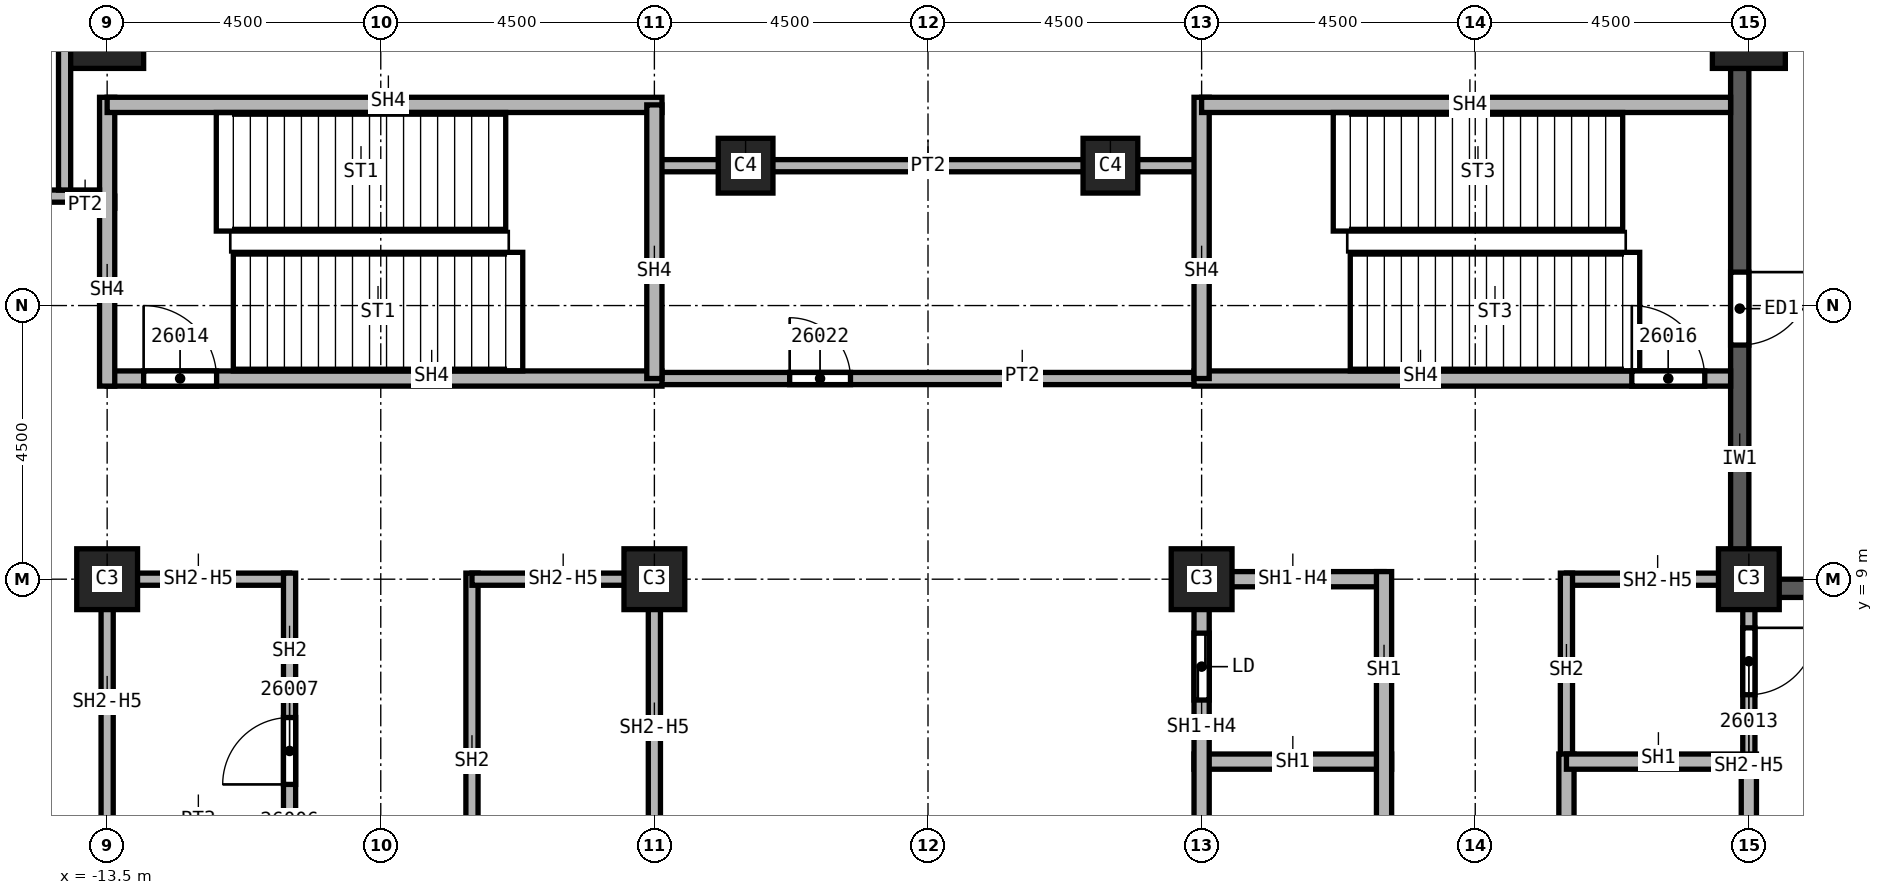
"""IFC4 building model, lengths in metres.
Left out: names, types, materials, properties, quantities, classifications, styles, units other than length and angle.
Written with IfcOpenShell. Run it as: python <this file> out.ifc"""

import sys

from ifc_helpers import new_model, si_unit, direction, frame, frame_2d, origin, origin_2d, place, context, subcontext, project, spatial, rectangle, extrude, element, fill, save


model = new_model("IFC4")
c1 = context("Model", 3, precision=1e-05, world=origin(), true_north=direction((0.0, 1.0)))
c2 = subcontext(c1, "Body", "Model", "MODEL_VIEW")
j1 = project(units=[si_unit("LENGTHUNIT", "METRE"), si_unit("PLANEANGLEUNIT", "RADIAN")], contexts=[c1])
p1 = place(None, origin())
s1 = spatial("IfcSite", under=j1, at=p1, CompositionType="ELEMENT")
p2 = place(p1, origin())
s2 = spatial("IfcBuilding", under=s1, at=p2, CompositionType="ELEMENT")
p3 = place(p2, frame((0.0, 0.0, 120.0)))
s3 = spatial("IfcBuildingStorey", under=s2, at=p3, CompositionType="ELEMENT", Elevation=120.0)
for number, where, z_axis, x_axis in (
    (1, (13.5, 18.0, 0.0), (0.0, 0.0, 1.0), (1.0, 0.0, 0.0)),
    (2, (-13.5, 18.0, 0.0), (0.0, 0.0, 1.0), (1.0, 0.0, 0.0)),
):
    element("IfcColumn", number, at=place(p3, frame(where, z_axis=z_axis, x_axis=x_axis)), inside=s3, PredefinedType="COLUMN", context=c2, shape_type="SweptSolid", body=[
        extrude(rectangle(XDim=1.2, YDim=1.2, at=origin_2d()), origin(), (0.0, 0.0, 1.0), 5.7),
    ])
for number, where, z_axis, x_axis in (
    (3, (4.5, 9.0, 0.0), (0.0, 0.0, 1.0), (1.0, 0.0, 0.0)),
    (4, (13.5, 9.0, 0.0), (0.0, 0.0, 1.0), (1.0, 0.0, 0.0)),
    (5, (-4.5, 9.0, 0.0), (0.0, 0.0, 1.0), (1.0, 0.0, 0.0)),
    (6, (-13.5, 9.0, 0.0), (0.0, 0.0, 1.0), (1.0, 0.0, 0.0)),
):
    element("IfcColumn", number, at=place(p3, frame(where, z_axis=z_axis, x_axis=x_axis)), inside=s3, PredefinedType="COLUMN", context=c2, shape_type="SweptSolid", body=[
        extrude(rectangle(XDim=1.0, YDim=1.0, at=origin_2d()), origin(), (0.0, 0.0, 1.0), 5.7),
    ])
for number, where, z_axis, x_axis in (
    (7, (3.0, 15.8, 0.0), (0.0, -0.206, 0.979), (1.0, 0.0, 0.0)),
    (8, (-3.0, 15.8, 0.0), (0.0, -0.206, 0.979), (1.0, 0.0, 0.0)),
):
    element("IfcColumn", number, at=place(p3, frame(where, z_axis=z_axis, x_axis=x_axis)), inside=s3, PredefinedType="COLUMN", context=c2, shape_type="SweptSolid", body=[
        extrude(rectangle(XDim=0.9, YDim=0.9, at=origin_2d()), origin(), (0.0, 0.0, 1.0), 5.825),
    ])
p4 = place(p3, frame((13.35, 17.4, 0.0), z_axis=(0.0, 0.0, 1.0), x_axis=(0.0, -1.0, 0.0)))
e9 = element("IfcWall", 9, at=p4, inside=s3, PredefinedType="SOLIDWALL", context=c2, shape_type="SweptSolid", body=[
    extrude(rectangle(XDim=8.35, YDim=0.3, at=frame_2d((4.175, 0.0))), origin(), (0.0, 0.0, 1.0), 5.1),
])
p5 = place(p4, frame((3.35, 0.0, 0.0)))
e10 = element("IfcOpeningElement", 10, at=p5, cuts=e9, PredefinedType="OPENING", context=c2, shape_type="SweptSolid", body=[
    extrude(rectangle(XDim=1.2, YDim=2.4, at=frame_2d((0.6, 1.2))), frame((0.0, 0.15, 0.0), z_axis=(0.0, -1.0, 0.0), x_axis=(1.0, 0.0, 0.0)), (0.0, 0.0, 1.0), 0.3),
])
p6 = place(p3, frame((21.9, 8.85, 0.0), z_axis=(0.0, 0.0, 1.0), x_axis=(-1.0, 0.0, 0.0)))
e11 = element("IfcWall", 11, at=p6, inside=s3, PredefinedType="SOLIDWALL", context=c2, shape_type="SweptSolid", body=[
    extrude(rectangle(XDim=8.35, YDim=0.3, at=frame_2d((4.175, 0.0))), origin(), (0.0, 0.0, 1.0), 5.1),
])
p7 = place(p3, frame((-14.1, 15.2, 0.0), z_axis=(0.0, 0.0, 1.0), x_axis=(1.0, 0.0, 0.0)))
e12 = element("IfcWall", 12, at=p7, inside=s3, PredefinedType="PARTITIONING", context=c2, shape_type="SweptSolid", body=[
    extrude(rectangle(XDim=0.725, YDim=0.2, at=frame_2d((0.363, 0.0))), origin(), (0.0, 0.0, 1.0), 5.7),
])
p8 = place(p3, frame((-4.625, 12.3, 0.0), z_axis=(0.0, 0.0, 1.0), x_axis=(1.0, 0.0, 0.0)))
e13 = element("IfcWall", 13, at=p8, inside=s3, PredefinedType="PARTITIONING", context=c2, shape_type="SweptSolid", body=[
    extrude(rectangle(XDim=9.25, YDim=0.2, at=frame_2d((4.625, 0.0))), origin(), (0.0, 0.0, 1.0), 5.7),
])
p9 = place(p8, frame((2.35, 0.0, 0.0)))
e14 = element("IfcOpeningElement", 14, at=p9, cuts=e13, PredefinedType="OPENING", context=c2, shape_type="SweptSolid", body=[
    extrude(rectangle(XDim=1.0, YDim=2.1, at=frame_2d((0.5, 1.05))), frame((0.0, 0.1, 0.0), z_axis=(0.0, -1.0, 0.0), x_axis=(1.0, 0.0, 0.0)), (0.0, 0.0, 1.0), 0.2),
])
p10 = place(p3, frame((-4.5, 15.8, 0.0), z_axis=(0.0, 0.0, 1.0), x_axis=(1.0, 0.0, 0.0)))
e15 = element("IfcWall", 15, at=p10, inside=s3, PredefinedType="PARTITIONING", context=c2, shape_type="SweptSolid", body=[
    extrude(rectangle(XDim=9.0, YDim=0.2, at=frame_2d((4.5, 0.0))), origin(), (0.0, 0.0, 1.0), 5.7),
])
p11 = place(p3, frame((-13.5, 5.0, 0.0), z_axis=(0.0, 0.0, 1.0), x_axis=(0.0, 1.0, 0.0)))
e16 = element("IfcWall", 16, at=p11, inside=s3, PredefinedType="SOLIDWALL", context=c2, shape_type="SweptSolid", body=[
    extrude(rectangle(XDim=4.1, YDim=0.2, at=frame_2d((2.05, 0.0))), origin(), (0.0, 0.0, 1.0), 4.938),
])
p12 = place(p3, frame((-13.5, 9.0, 0.0), z_axis=(0.0, 0.0, 1.0), x_axis=(1.0, 0.0, 0.0)))
e17 = element("IfcWall", 17, at=p12, inside=s3, PredefinedType="SOLIDWALL", context=c2, shape_type="SweptSolid", body=[
    extrude(rectangle(XDim=3.0, YDim=0.2, at=frame_2d((1.5, 0.0))), origin(), (0.0, 0.0, 1.0), 4.938),
])
p13 = place(p3, frame((-10.5, 4.925, 0.0), z_axis=(0.0, 0.0, 1.0), x_axis=(0.0, 1.0, 0.0)))
e18 = element("IfcWall", 18, at=p13, inside=s3, PredefinedType="SOLIDWALL", context=c2, shape_type="SweptSolid", body=[
    extrude(rectangle(XDim=4.175, YDim=0.2, at=frame_2d((2.087, 0.0))), origin(), (0.0, 0.0, 1.0), 5.7),
])
p14 = place(p13, frame((0.7, 0.0, 0.0)))
e19 = element("IfcOpeningElement", 19, at=p14, cuts=e18, PredefinedType="OPENING", context=c2, shape_type="SweptSolid", body=[
    extrude(rectangle(XDim=1.1, YDim=2.1, at=frame_2d((0.55, 1.05))), frame((0.0, 0.1, 0.0), z_axis=(0.0, -1.0, 0.0), x_axis=(1.0, 0.0, 0.0)), (0.0, 0.0, 1.0), 0.2),
])
p15 = place(p3, frame((-7.5, 2.875, 0.0), z_axis=(0.0, 0.0, 1.0), x_axis=(0.0, 1.0, 0.0)))
e20 = element("IfcWall", 20, at=p15, inside=s3, PredefinedType="SOLIDWALL", context=c2, shape_type="SweptSolid", body=[
    extrude(rectangle(XDim=6.225, YDim=0.2, at=frame_2d((3.113, 0.0))), origin(), (0.0, 0.0, 1.0), 5.7),
])
p16 = place(p3, frame((-7.5, 9.0, 0.0), z_axis=(0.0, 0.0, 1.0), x_axis=(1.0, 0.0, 0.0)))
e21 = element("IfcWall", 21, at=p16, inside=s3, PredefinedType="SOLIDWALL", context=c2, shape_type="SweptSolid", body=[
    extrude(rectangle(XDim=3.0, YDim=0.2, at=frame_2d((1.5, 0.0))), origin(), (0.0, 0.0, 1.0), 4.938),
])
p17 = place(p3, frame((-4.5, 9.1, 0.0), z_axis=(0.0, 0.0, 1.0), x_axis=(0.0, -1.0, 0.0)))
e22 = element("IfcWall", 22, at=p17, inside=s3, PredefinedType="SOLIDWALL", context=c2, shape_type="SweptSolid", body=[
    extrude(rectangle(XDim=9.1, YDim=0.2, at=frame_2d((4.55, 0.0))), origin(), (0.0, 0.0, 1.0), 4.938),
])
p18 = place(p17, frame((4.9, 0.0, 0.0)))
e23 = element("IfcOpeningElement", 23, at=p18, cuts=e22, PredefinedType="OPENING", context=c2, shape_type="SweptSolid", body=[
    extrude(rectangle(XDim=1.1, YDim=2.1, at=frame_2d((0.55, 1.05))), frame((0.0, 0.1, 0.0), z_axis=(0.0, -1.0, 0.0), x_axis=(1.0, 0.0, 0.0)), (0.0, 0.0, 1.0), 0.2),
])
p19 = place(p3, frame((10.5, 9.0, 0.0), z_axis=(0.0, 0.0, 1.0), x_axis=(1.0, 0.0, 0.0)))
e24 = element("IfcWall", 24, at=p19, inside=s3, PredefinedType="SOLIDWALL", context=c2, shape_type="SweptSolid", body=[
    extrude(rectangle(XDim=3.0, YDim=0.2, at=frame_2d((1.5, 0.0))), origin(), (0.0, 0.0, 1.0), 4.938),
])
p20 = place(p3, frame((10.5, 9.1, 0.0), z_axis=(0.0, 0.0, 1.0), x_axis=(0.0, -1.0, 0.0)))
e25 = element("IfcWall", 25, at=p20, inside=s3, PredefinedType="SOLIDWALL", context=c2, shape_type="SweptSolid", body=[
    extrude(rectangle(XDim=3.225, YDim=0.2, at=frame_2d((1.613, 0.0))), origin(), (0.0, 0.0, 1.0), 5.7),
])
p21 = place(p3, frame((13.5, 9.05, 0.0), z_axis=(0.0, 0.0, 1.0), x_axis=(0.0, -1.0, 0.0)))
e26 = element("IfcWall", 26, at=p21, inside=s3, PredefinedType="SOLIDWALL", context=c2, shape_type="SweptSolid", body=[
    extrude(rectangle(XDim=3.05, YDim=0.2, at=frame_2d((1.525, 0.0))), origin(), (0.0, 0.0, 1.0), 4.938),
])
p22 = place(p21, frame((0.85, 0.0, 0.0)))
e27 = element("IfcOpeningElement", 27, at=p22, cuts=e26, PredefinedType="OPENING", context=c2, shape_type="SweptSolid", body=[
    extrude(rectangle(XDim=1.1, YDim=2.1, at=frame_2d((0.55, 1.05))), frame((0.0, 0.1, 0.0), z_axis=(0.0, -1.0, 0.0), x_axis=(1.0, 0.0, 0.0)), (0.0, 0.0, 1.0), 0.2),
])
p23 = place(p3, frame((4.375, 6.0, 0.0), z_axis=(0.0, 0.0, 1.0), x_axis=(1.0, 0.0, 0.0)))
e28 = element("IfcWall", 28, at=p23, inside=s3, PredefinedType="SOLIDWALL", context=c2, shape_type="SweptSolid", body=[
    extrude(rectangle(XDim=3.25, YDim=0.25, at=frame_2d((1.625, 0.0))), origin(), (0.0, 0.0, 1.0), 5.7),
])
p24 = place(p3, frame((4.5, 0.0, 0.0), z_axis=(0.0, 0.0, 1.0), x_axis=(0.0, 1.0, 0.0)))
e29 = element("IfcWall", 29, at=p24, inside=s3, PredefinedType="SOLIDWALL", context=c2, shape_type="SweptSolid", body=[
    extrude(rectangle(XDim=9.125, YDim=0.25, at=frame_2d((4.562, 0.0))), origin(), (0.0, 0.0, 1.0), 4.938),
])
p25 = place(p24, frame((0.95, 0.0, 0.0)))
e30 = element("IfcOpeningElement", 30, at=p25, cuts=e29, PredefinedType="OPENING", context=c2, shape_type="SweptSolid", body=[
    extrude(rectangle(XDim=1.1, YDim=2.1, at=frame_2d((0.55, 1.05))), frame((0.0, 0.125, 0.0), z_axis=(0.0, -1.0, 0.0), x_axis=(1.0, 0.0, 0.0)), (0.0, 0.0, 1.0), 0.25),
])
p26 = place(p24, frame((3.95, 0.0, 0.0)))
e31 = element("IfcOpeningElement", 31, at=p26, cuts=e29, PredefinedType="OPENING", context=c2, shape_type="SweptSolid", body=[
    extrude(rectangle(XDim=1.1, YDim=2.1, at=frame_2d((0.55, 1.05))), frame((0.0, 0.125, 0.0), z_axis=(0.0, -1.0, 0.0), x_axis=(1.0, 0.0, 0.0)), (0.0, 0.0, 1.0), 0.25),
])
p27 = place(p24, frame((7.012, 0.0, 0.0)))
e32 = element("IfcOpeningElement", 32, at=p27, cuts=e29, PredefinedType="OPENING", context=c2, shape_type="SweptSolid", body=[
    extrude(rectangle(XDim=1.1, YDim=2.1, at=frame_2d((0.55, 1.05))), frame((0.0, 0.125, 0.0), z_axis=(0.0, -1.0, 0.0), x_axis=(1.0, 0.0, 0.0)), (0.0, 0.0, 1.0), 0.25),
])
p28 = place(p3, frame((4.5, 9.0, 0.0), z_axis=(0.0, 0.0, 1.0), x_axis=(1.0, 0.0, 0.0)))
e33 = element("IfcWall", 33, at=p28, inside=s3, PredefinedType="SOLIDWALL", context=c2, shape_type="SweptSolid", body=[
    extrude(rectangle(XDim=3.0, YDim=0.25, at=frame_2d((1.5, 0.0))), origin(), (0.0, 0.0, 1.0), 4.938),
])
p29 = place(p3, frame((7.5, 9.125, 0.0), z_axis=(0.0, 0.0, 1.0), x_axis=(0.0, -1.0, 0.0)))
e34 = element("IfcWall", 34, at=p29, inside=s3, PredefinedType="SOLIDWALL", context=c2, shape_type="SweptSolid", body=[
    extrude(rectangle(XDim=12.25, YDim=0.25, at=frame_2d((6.125, 0.0))), origin(), (0.0, 0.0, 1.0), 5.7),
])
p30 = place(p3, frame((10.5, 6.125, 0.0), z_axis=(0.0, 0.0, 1.0), x_axis=(0.0, -1.0, 0.0)))
e35 = element("IfcWall", 35, at=p30, inside=s3, PredefinedType="SOLIDWALL", context=c2, shape_type="SweptSolid", body=[
    extrude(rectangle(XDim=9.25, YDim=0.25, at=frame_2d((4.625, 0.0))), origin(), (0.0, 0.0, 1.0), 5.7),
])
p31 = place(p30, frame((7.075, 0.0, 0.0)))
e36 = element("IfcOpeningElement", 36, at=p31, cuts=e35, PredefinedType="OPENING", context=c2, shape_type="SweptSolid", body=[
    extrude(rectangle(XDim=1.1, YDim=2.1, at=frame_2d((0.55, 1.05))), frame((0.0, 0.125, 0.0), z_axis=(0.0, -1.0, 0.0), x_axis=(1.0, 0.0, 0.0)), (0.0, 0.0, 1.0), 0.25),
])
p32 = place(p30, frame((4.075, 0.0, 0.0)))
e37 = element("IfcOpeningElement", 37, at=p32, cuts=e35, PredefinedType="OPENING", context=c2, shape_type="SweptSolid", body=[
    extrude(rectangle(XDim=1.1, YDim=2.1, at=frame_2d((0.55, 1.05))), frame((0.0, 0.125, 0.0), z_axis=(0.0, -1.0, 0.0), x_axis=(1.0, 0.0, 0.0)), (0.0, 0.0, 1.0), 0.25),
])
p33 = place(p3, frame((10.5, 6.0, 0.0), z_axis=(0.0, 0.0, 1.0), x_axis=(1.0, 0.0, 0.0)))
e38 = element("IfcWall", 38, at=p33, inside=s3, PredefinedType="SOLIDWALL", context=c2, shape_type="SweptSolid", body=[
    extrude(rectangle(XDim=3.125, YDim=0.25, at=frame_2d((1.562, 0.0))), origin(), (0.0, 0.0, 1.0), 5.7),
])
p34 = place(p3, frame((13.5, 6.0, 0.0), z_axis=(0.0, 0.0, 1.0), x_axis=(0.0, -1.0, 0.0)))
e39 = element("IfcWall", 39, at=p34, inside=s3, PredefinedType="SOLIDWALL", context=c2, shape_type="SweptSolid", body=[
    extrude(rectangle(XDim=9.0, YDim=0.25, at=frame_2d((4.5, 0.0))), origin(), (0.0, 0.0, 1.0), 4.938),
])
p35 = place(p3, frame((-13.5, 12.3, 0.0), z_axis=(0.0, 0.0, 1.0), x_axis=(1.0, 0.0, 0.0)))
e40 = element("IfcWall", 40, at=p35, inside=s3, PredefinedType="SOLIDWALL", context=c2, shape_type="SweptSolid", body=[
    extrude(rectangle(XDim=9.125, YDim=0.25, at=frame_2d((4.562, 0.0))), origin(), (0.0, 0.0, 1.0), 5.7),
])
p36 = place(p35, frame((0.6, 0.0, 0.0)))
e41 = element("IfcOpeningElement", 41, at=p36, cuts=e40, PredefinedType="OPENING", context=c2, shape_type="SweptSolid", body=[
    extrude(rectangle(XDim=1.2, YDim=2.1, at=frame_2d((0.6, 1.05))), frame((0.0, 0.125, 0.0), z_axis=(0.0, -1.0, 0.0), x_axis=(1.0, 0.0, 0.0)), (0.0, 0.0, 1.0), 0.25),
])
p37 = place(p3, frame((-13.5, 12.175, 0.0), z_axis=(0.0, 0.0, 1.0), x_axis=(0.0, 1.0, 0.0)))
e42 = element("IfcWall", 42, at=p37, inside=s3, PredefinedType="SOLIDWALL", context=c2, shape_type="SweptSolid", body=[
    extrude(rectangle(XDim=4.75, YDim=0.25, at=frame_2d((2.375, 0.0))), origin(), (0.0, 0.0, 1.0), 5.7),
])
p38 = place(p3, frame((-13.5, 16.8, 0.0), z_axis=(0.0, 0.0, 1.0), x_axis=(1.0, 0.0, 0.0)))
e43 = element("IfcWall", 43, at=p38, inside=s3, PredefinedType="SOLIDWALL", context=c2, shape_type="SweptSolid", body=[
    extrude(rectangle(XDim=9.125, YDim=0.25, at=frame_2d((4.562, 0.0))), origin(), (0.0, 0.0, 1.0), 5.7),
])
p39 = place(p3, frame((-4.5, 16.8, 0.0), z_axis=(0.0, 0.0, 1.0), x_axis=(0.0, -1.0, 0.0)))
e44 = element("IfcWall", 44, at=p39, inside=s3, PredefinedType="SOLIDWALL", context=c2, shape_type="SweptSolid", body=[
    extrude(rectangle(XDim=4.5, YDim=0.25, at=frame_2d((2.25, 0.0))), origin(), (0.0, 0.0, 1.0), 5.7),
])
p40 = place(p3, frame((4.375, 12.3, 0.0), z_axis=(0.0, 0.0, 1.0), x_axis=(1.0, 0.0, 0.0)))
e45 = element("IfcWall", 45, at=p40, inside=s3, PredefinedType="SOLIDWALL", context=c2, shape_type="SweptSolid", body=[
    extrude(rectangle(XDim=8.825, YDim=0.25, at=frame_2d((4.413, 0.0))), origin(), (0.0, 0.0, 1.0), 5.7),
])
p41 = place(p40, frame((7.2, 0.0, 0.0)))
e46 = element("IfcOpeningElement", 46, at=p41, cuts=e45, PredefinedType="OPENING", context=c2, shape_type="SweptSolid", body=[
    extrude(rectangle(XDim=1.2, YDim=2.1, at=frame_2d((0.6, 1.05))), frame((0.0, 0.125, 0.0), z_axis=(0.0, -1.0, 0.0), x_axis=(1.0, 0.0, 0.0)), (0.0, 0.0, 1.0), 0.25),
])
p42 = place(p3, frame((4.5, 12.3, 0.0), z_axis=(0.0, 0.0, 1.0), x_axis=(0.0, 1.0, 0.0)))
e47 = element("IfcWall", 47, at=p42, inside=s3, PredefinedType="SOLIDWALL", context=c2, shape_type="SweptSolid", body=[
    extrude(rectangle(XDim=4.625, YDim=0.25, at=frame_2d((2.312, 0.0))), origin(), (0.0, 0.0, 1.0), 5.7),
])
p43 = place(p3, frame((4.5, 16.8, 0.0), z_axis=(0.0, 0.0, 1.0), x_axis=(1.0, 0.0, 0.0)))
e48 = element("IfcWall", 48, at=p43, inside=s3, PredefinedType="SOLIDWALL", context=c2, shape_type="SweptSolid", body=[
    extrude(rectangle(XDim=8.7, YDim=0.25, at=frame_2d((4.35, 0.0))), origin(), (0.0, 0.0, 1.0), 5.7),
])
p44 = place(p3, frame((-21.9, 15.3, 0.0), z_axis=(0.0, 0.0, 1.0), x_axis=(1.0, 0.0, 0.0)))
e49 = element("IfcWall", 49, at=p44, inside=s3, PredefinedType="SOLIDWALL", context=c2, shape_type="SweptSolid", body=[
    extrude(rectangle(XDim=8.275, YDim=0.2, at=frame_2d((4.137, 0.0))), origin(), (0.0, 0.0, 1.0), 5.7),
])
p45 = place(p44, frame((4.8, 0.0, 0.0)))
e50 = element("IfcOpeningElement", 50, at=p45, cuts=e49, PredefinedType="OPENING", context=c2, shape_type="SweptSolid", body=[
    extrude(rectangle(XDim=1.2, YDim=2.1, at=frame_2d((0.6, 1.05))), frame((0.0, 0.1, 0.0), z_axis=(0.0, -1.0, 0.0), x_axis=(1.0, 0.0, 0.0)), (0.0, 0.0, 1.0), 0.2),
])
p46 = place(p3, frame((-14.2, 15.4, 0.0), z_axis=(0.0, 0.0, 1.0), x_axis=(0.0, 1.0, 0.0)))
e51 = element("IfcWall", 51, at=p46, inside=s3, PredefinedType="SOLIDWALL", context=c2, shape_type="SweptSolid", body=[
    extrude(rectangle(XDim=5.9, YDim=0.2, at=frame_2d((2.95, 0.0))), origin(), (0.0, 0.0, 1.0), 5.7),
])
p47 = place(p5, origin())
e52 = element("IfcDoor", 52, at=p47, inside=s3, OperationType="SINGLE_SWING_LEFT", PredefinedType="DOOR", context=c2, shape_type="SweptSolid", body=[
    extrude(rectangle(XDim=1.2, YDim=2.4, at=frame_2d((0.6, 1.2))), frame((0.0, 0.025, 0.0), z_axis=(0.0, -1.0, 0.0), x_axis=(1.0, 0.0, 0.0)), (0.0, 0.0, 1.0), 0.05),
])
fill(e10, e52)
p48 = place(p14, origin())
e53 = element("IfcDoor", 53, at=p48, inside=s3, OperationType="SINGLE_SWING_RIGHT", PredefinedType="DOOR", context=c2, shape_type="SweptSolid", body=[
    extrude(rectangle(XDim=1.1, YDim=2.1, at=frame_2d((0.55, 1.05))), frame((0.0, 0.025, 0.0), z_axis=(0.0, -1.0, 0.0), x_axis=(1.0, 0.0, 0.0)), (0.0, 0.0, 1.0), 0.05),
])
fill(e19, e53)
p49 = place(p22, origin())
e54 = element("IfcDoor", 54, at=p49, inside=s3, OperationType="SINGLE_SWING_RIGHT", PredefinedType="DOOR", context=c2, shape_type="SweptSolid", body=[
    extrude(rectangle(XDim=1.1, YDim=2.1, at=frame_2d((0.55, 1.05))), frame((0.0, 0.025, 0.0), z_axis=(0.0, -1.0, 0.0), x_axis=(1.0, 0.0, 0.0)), (0.0, 0.0, 1.0), 0.05),
])
fill(e27, e54)
p50 = place(p36, origin())
e55 = element("IfcDoor", 55, at=p50, inside=s3, OperationType="SINGLE_SWING_LEFT", PredefinedType="DOOR", context=c2, shape_type="SweptSolid", body=[
    extrude(rectangle(XDim=1.2, YDim=2.1, at=frame_2d((0.6, 1.05))), frame((0.0, 0.025, 0.0), z_axis=(0.0, -1.0, 0.0), x_axis=(1.0, 0.0, 0.0)), (0.0, 0.0, 1.0), 0.05),
])
fill(e41, e55)
p51 = place(p41, origin())
e56 = element("IfcDoor", 56, at=p51, inside=s3, OperationType="SINGLE_SWING_LEFT", PredefinedType="DOOR", context=c2, shape_type="SweptSolid", body=[
    extrude(rectangle(XDim=1.2, YDim=2.1, at=frame_2d((0.6, 1.05))), frame((0.0, 0.025, 0.0), z_axis=(0.0, -1.0, 0.0), x_axis=(1.0, 0.0, 0.0)), (0.0, 0.0, 1.0), 0.05),
])
fill(e46, e56)
p52 = place(p9, origin())
e57 = element("IfcDoor", 57, at=p52, inside=s3, OperationType="SINGLE_SWING_LEFT", PredefinedType="DOOR", context=c2, shape_type="SweptSolid", body=[
    extrude(rectangle(XDim=1.0, YDim=2.1, at=frame_2d((0.5, 1.05))), frame((0.0, 0.025, 0.0), z_axis=(0.0, -1.0, 0.0), x_axis=(1.0, 0.0, 0.0)), (0.0, 0.0, 1.0), 0.05),
])
fill(e14, e57)
p53 = place(p27, origin())
e58 = element("IfcDoor", 58, at=p53, inside=s3, OperationType="SLIDING_TO_LEFT", PredefinedType="DOOR", context=c2, shape_type="SweptSolid", body=[
    extrude(rectangle(XDim=1.1, YDim=2.1, at=frame_2d((0.55, 1.05))), frame((0.0, 0.025, 0.0), z_axis=(0.0, -1.0, 0.0), x_axis=(1.0, 0.0, 0.0)), (0.0, 0.0, 1.0), 0.05),
])
fill(e32, e58)
save(model, sys.argv[1])
